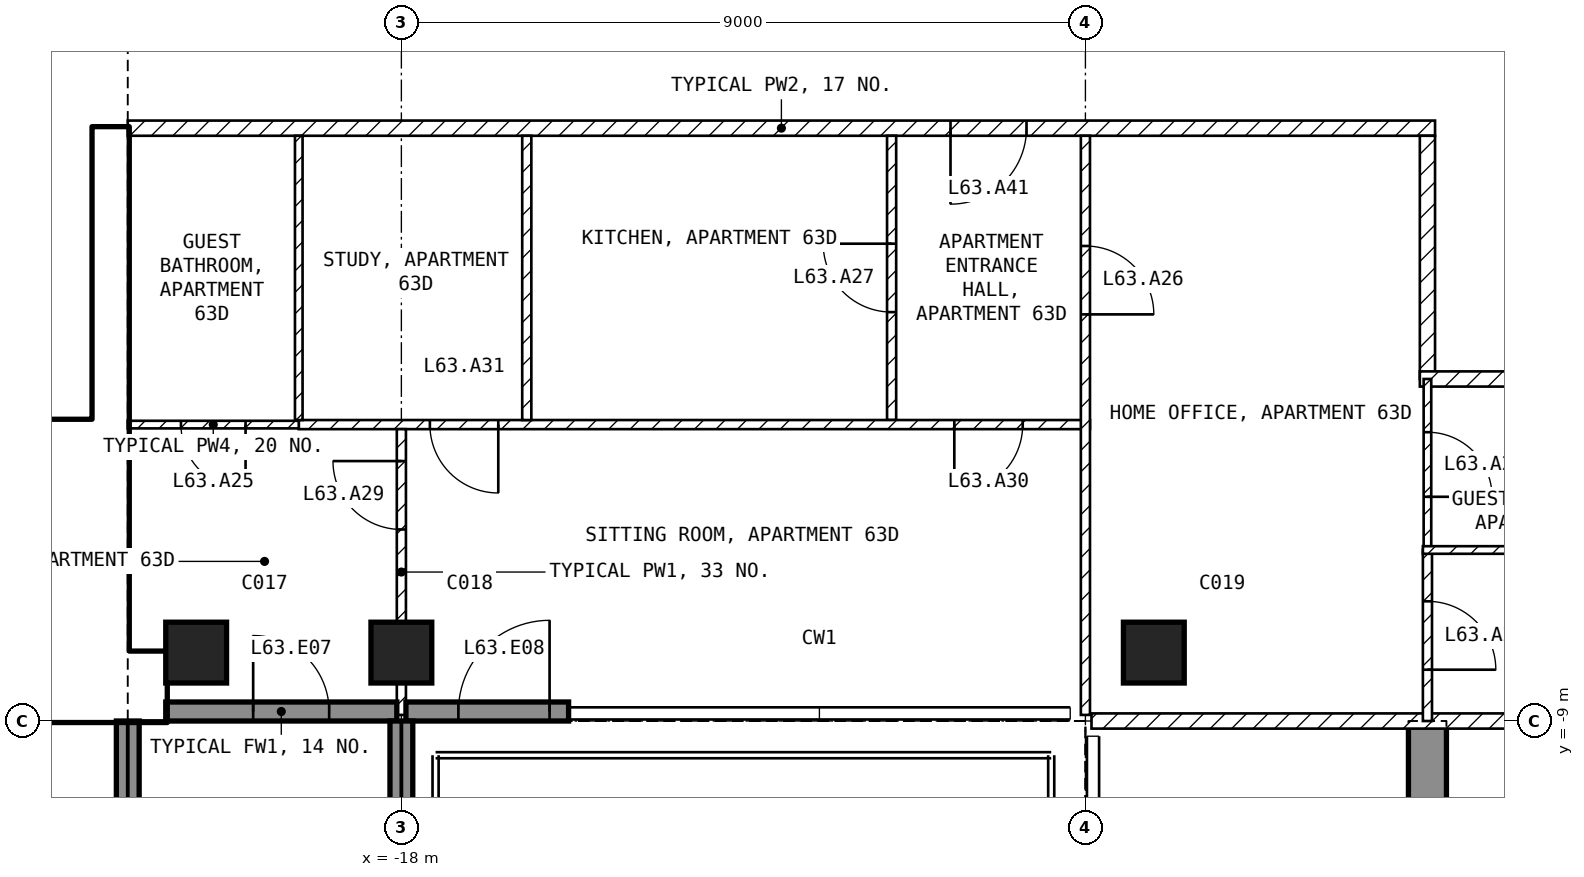
"""IFC4 building model, lengths in metres.
Left out: names, types, materials, properties, quantities, classifications, styles, units other than length and angle.
Written with IfcOpenShell. Run it as: python <this file> out.ifc"""

import sys

from ifc_helpers import new_model, si_unit, direction, frame, frame_2d, origin, origin_2d, place, context, subcontext, project, spatial, polyline, rectangle, outline, extrude, element, fill, save


model = new_model("IFC4")
c1 = context("Model", 3, precision=1e-05, world=origin(), true_north=direction((0.0, 1.0)))
c2 = subcontext(c1, "Body", "Model", "MODEL_VIEW")
j1 = project(units=[si_unit("LENGTHUNIT", "METRE"), si_unit("PLANEANGLEUNIT", "RADIAN")], contexts=[c1])
p1 = place(None, origin())
s1 = spatial("IfcSite", under=j1, at=p1, CompositionType="ELEMENT")
p2 = place(p1, origin())
s2 = spatial("IfcBuilding", under=s1, at=p2, CompositionType="ELEMENT")
p3 = place(p2, frame((0.0, 0.0, 250.0)))
s3 = spatial("IfcBuildingStorey", under=s2, at=p3, CompositionType="ELEMENT", Elevation=250.0)
for number, where, z_axis, x_axis in (
    (1, (-20.7, -8.1, -0.25), (0.0, 0.0, 1.0), (1.0, 0.0, 0.0)),
    (2, (-18.0, -8.1, -0.25), (0.0, 0.0, 1.0), (1.0, 0.0, 0.0)),
    (3, (-8.1, -8.1, -0.25), (0.0, 0.0, 1.0), (1.0, 0.0, 0.0)),
):
    element("IfcColumn", number, at=place(p3, frame(where, z_axis=z_axis, x_axis=x_axis)), inside=s3, PredefinedType="COLUMN", context=c2, shape_type="SweptSolid", body=[
        extrude(rectangle(XDim=0.8, YDim=0.8, at=origin_2d()), origin(), (0.0, 0.0, 1.0), 3.5),
    ])
p4 = place(p3, frame((-4.75, -16.7, -0.25), z_axis=(1.0, 0.0, 0.0), x_axis=(0.0, 1.0, 0.0)))
e4 = element("IfcWall", 4, at=p4, inside=s3, PredefinedType="SHEAR", context=c2, shape_type="SweptSolid", body=[
    extrude(outline(polyline([(0.0, 0.0), (3.2, 0.0), (3.2, 2.65), (5.6, 2.65), (5.6, 0.0), (7.7, 0.0), (7.7, 3.5), (0.0, 3.5), (0.0, 0.0)])), origin(), (0.0, 0.0, 1.0), 0.5),
])
p5 = place(p3, frame((-21.1, -8.875, 0.0), z_axis=(0.0, 0.0, 1.0), x_axis=(1.0, 0.0, 0.0)))
e5 = element("IfcWall", 5, at=p5, inside=s3, PredefinedType="SOLIDWALL", context=c2, shape_type="SweptSolid", body=[
    extrude(rectangle(XDim=3.04, YDim=0.25, at=frame_2d((1.52, 0.0))), origin(), (0.0, 0.0, 1.0), 3.25),
])
p6 = place(p5, frame((1.15, 0.0, 0.0)))
e6 = element("IfcOpeningElement", 6, at=p6, cuts=e5, PredefinedType="OPENING", context=c2, shape_type="SweptSolid", body=[
    extrude(rectangle(XDim=1.0, YDim=2.4, at=frame_2d((0.5, 1.2))), frame((0.0, 0.135, 0.0), z_axis=(0.0, -1.0, 0.0), x_axis=(1.0, 0.0, 0.0)), (0.0, 0.0, 1.0), 0.27),
])
p7 = place(p3, frame((-17.94, -8.875, 0.0), z_axis=(0.0, 0.0, 1.0), x_axis=(1.0, 0.0, 0.0)))
e7 = element("IfcWall", 7, at=p7, inside=s3, PredefinedType="SOLIDWALL", context=c2, shape_type="SweptSolid", body=[
    extrude(rectangle(XDim=2.14, YDim=0.25, at=frame_2d((1.07, 0.0))), origin(), (0.0, 0.0, 1.0), 3.25),
])
p8 = place(p7, frame((0.69, 0.0, 0.0)))
e8 = element("IfcOpeningElement", 8, at=p8, cuts=e7, PredefinedType="OPENING", context=c2, shape_type="SweptSolid", body=[
    extrude(rectangle(XDim=1.2, YDim=2.4, at=frame_2d((0.6, 1.2))), frame((0.0, 0.135, 0.0), z_axis=(0.0, -1.0, 0.0), x_axis=(1.0, 0.0, 0.0)), (0.0, 0.0, 1.0), 0.27),
])
p9 = place(p3, frame((-21.6, -9.0, 0.0), z_axis=(0.0, 0.0, 1.0), x_axis=(0.0, -1.0, 0.0)))
e9 = element("IfcWall", 9, at=p9, inside=s3, PredefinedType="SOLIDWALL", context=c2, shape_type="SweptSolid", body=[
    extrude(rectangle(XDim=2.7, YDim=0.3, at=frame_2d((1.35, 0.0))), origin(), (0.0, 0.0, 1.0), 3.25),
])
p10 = place(p3, frame((-18.0, -9.0, 0.0), z_axis=(0.0, 0.0, 1.0), x_axis=(0.0, -1.0, 0.0)))
e10 = element("IfcWall", 10, at=p10, inside=s3, PredefinedType="SOLIDWALL", context=c2, shape_type="SweptSolid", body=[
    extrude(rectangle(XDim=2.74, YDim=0.3, at=frame_2d((1.37, 0.0))), origin(), (0.0, 0.0, 1.0), 3.25),
])
p11 = place(p3, frame((-30.2, -8.55, 0.0), z_axis=(0.0, 0.0, 1.0), x_axis=(1.0, 0.0, 0.0)))
e11 = element("IfcWall", 11, at=p11, inside=s3, PredefinedType="SHEAR", context=c2, shape_type="SweptSolid", body=[
    extrude(rectangle(XDim=9.1, YDim=0.9, at=frame_2d((4.55, 0.0))), origin(), (0.0, 0.0, 1.0), 3.25),
])
p12 = place(p3, frame((-21.825, -8.1, 0.0), z_axis=(0.0, 0.0, 1.0), x_axis=(0.0, 1.0, 0.0)))
e12 = element("IfcWall", 12, at=p12, inside=s3, PredefinedType="SHEAR", context=c2, shape_type="SweptSolid", body=[
    extrude(rectangle(XDim=6.9, YDim=0.45, at=frame_2d((3.45, 0.0))), origin(), (0.0, 0.0, 1.0), 3.25),
])
p13 = place(p3, frame((-28.35, -5.15, 0.0), z_axis=(0.0, 0.0, 1.0), x_axis=(1.0, 0.0, 0.0)))
e13 = element("IfcWall", 13, at=p13, inside=s3, PredefinedType="SOLIDWALL", context=c2, shape_type="SweptSolid", body=[
    extrude(rectangle(XDim=6.3, YDim=0.2, at=frame_2d((3.15, 0.0))), origin(), (0.0, 0.0, 1.0), 3.25),
])
p14 = place(p13, frame((5.1, 0.0, 0.0)))
e14 = element("IfcOpeningElement", 14, at=p14, cuts=e13, PredefinedType="OPENING", context=c2, shape_type="SweptSolid", body=[
    extrude(rectangle(XDim=1.0, YDim=2.1, at=frame_2d((0.5, 1.05))), frame((0.0, 0.11, 0.0), z_axis=(0.0, -1.0, 0.0), x_axis=(1.0, 0.0, 0.0)), (0.0, 0.0, 1.0), 0.22),
])
p15 = place(p3, frame((-4.4, -1.2, 0.0), z_axis=(0.0, 0.0, 1.0), x_axis=(-1.0, 0.0, 0.0)))
e15 = element("IfcWall", 15, at=p15, inside=s3, PredefinedType="PARTITIONING", context=c2, shape_type="SweptSolid", body=[
    extrude(rectangle(XDim=17.2, YDim=0.2, at=frame_2d((8.6, 0.0))), origin(), (0.0, 0.0, 1.0), 3.25),
])
p16 = place(p15, frame((5.375, 0.0, 0.0)))
e16 = element("IfcOpeningElement", 16, at=p16, cuts=e15, PredefinedType="OPENING", context=c2, shape_type="SweptSolid", body=[
    extrude(rectangle(XDim=1.0, YDim=2.1, at=frame_2d((0.5, 1.05))), frame((0.0, 0.11, 0.0), z_axis=(0.0, -1.0, 0.0), x_axis=(1.0, 0.0, 0.0)), (0.0, 0.0, 1.0), 0.22),
])
p17 = place(p3, frame((-4.5, -4.5, 0.0), z_axis=(0.0, 0.0, 1.0), x_axis=(0.0, 1.0, 0.0)))
e17 = element("IfcWall", 17, at=p17, inside=s3, PredefinedType="PARTITIONING", context=c2, shape_type="SweptSolid", body=[
    extrude(rectangle(XDim=3.2, YDim=0.2, at=frame_2d((1.6, 0.0))), origin(), (0.0, 0.0, 1.0), 3.25),
])
p18 = place(p3, frame((-1.1, -4.5, 0.0), z_axis=(0.0, 0.0, 1.0), x_axis=(-1.0, 0.0, 0.0)))
e18 = element("IfcWall", 18, at=p18, inside=s3, PredefinedType="PARTITIONING", context=c2, shape_type="SweptSolid", body=[
    extrude(rectangle(XDim=3.5, YDim=0.2, at=frame_2d((1.75, 0.0))), origin(), (0.0, 0.0, 1.0), 3.25),
])
p19 = place(p3, frame((8.92, -9.0, 0.0), z_axis=(0.0, 0.0, 1.0), x_axis=(-1.0, 0.0, 0.0)))
e19 = element("IfcWall", 19, at=p19, inside=s3, PredefinedType="PARTITIONING", context=c2, shape_type="SweptSolid", body=[
    extrude(rectangle(XDim=17.84, YDim=0.2, at=frame_2d((8.92, 0.0))), origin(), (0.0, 0.0, 1.0), 3.25),
])
p20 = place(p19, frame((8.42, 0.0, 0.0)))
e20 = element("IfcOpeningElement", 20, at=p20, cuts=e19, PredefinedType="OPENING", context=c2, shape_type="SweptSolid", body=[
    extrude(rectangle(XDim=1.0, YDim=2.1, at=frame_2d((0.5, 1.05))), frame((0.0, 0.11, 0.0), z_axis=(0.0, -1.0, 0.0), x_axis=(1.0, 0.0, 0.0)), (0.0, 0.0, 1.0), 0.22),
])
p21 = place(p3, frame((-11.55, -5.04, 0.0), z_axis=(0.0, 0.0, 1.0), x_axis=(0.0, 1.0, 0.0)))
e21 = element("IfcWall", 21, at=p21, inside=s3, PredefinedType="PARTITIONING", context=c2, shape_type="SweptSolid", body=[
    extrude(rectangle(XDim=3.74, YDim=0.12, at=frame_2d((1.87, 0.0))), origin(), (0.0, 0.0, 1.0), 3.25),
])
p22 = place(p21, frame((1.42, 0.0, 0.0)))
e22 = element("IfcOpeningElement", 22, at=p22, cuts=e21, PredefinedType="OPENING", context=c2, shape_type="SweptSolid", body=[
    extrude(rectangle(XDim=0.9, YDim=2.1, at=frame_2d((0.45, 1.05))), frame((0.0, 0.07, 0.0), z_axis=(0.0, -1.0, 0.0), x_axis=(1.0, 0.0, 0.0)), (0.0, 0.0, 1.0), 0.14),
])
p23 = place(p3, frame((-8.94, -5.1, 0.0), z_axis=(0.0, 0.0, 1.0), x_axis=(-1.0, 0.0, 0.0)))
e23 = element("IfcWall", 23, at=p23, inside=s3, PredefinedType="PARTITIONING", context=c2, shape_type="SweptSolid", body=[
    extrude(rectangle(XDim=10.41, YDim=0.12, at=frame_2d((5.205, 0.0))), origin(), (0.0, 0.0, 1.0), 3.25),
])
p24 = place(p23, frame((0.885, 0.0, 0.0)))
e24 = element("IfcOpeningElement", 24, at=p24, cuts=e23, PredefinedType="OPENING", context=c2, shape_type="SweptSolid", body=[
    extrude(rectangle(XDim=0.9, YDim=2.1, at=frame_2d((0.45, 1.05))), frame((0.0, 0.07, 0.0), z_axis=(0.0, -1.0, 0.0), x_axis=(1.0, 0.0, 0.0)), (0.0, 0.0, 1.0), 0.14),
])
p25 = place(p23, frame((7.785, 0.0, 0.0)))
e25 = element("IfcOpeningElement", 25, at=p25, cuts=e23, PredefinedType="OPENING", context=c2, shape_type="SweptSolid", body=[
    extrude(rectangle(XDim=0.9, YDim=2.1, at=frame_2d((0.45, 1.05))), frame((0.0, 0.07, 0.0), z_axis=(0.0, -1.0, 0.0), x_axis=(1.0, 0.0, 0.0)), (0.0, 0.0, 1.0), 0.14),
])
p26 = place(p3, frame((-9.0, -1.3, 0.0), z_axis=(0.0, 0.0, 1.0), x_axis=(0.0, -1.0, 0.0)))
e26 = element("IfcWall", 26, at=p26, inside=s3, PredefinedType="PARTITIONING", context=c2, shape_type="SweptSolid", body=[
    extrude(rectangle(XDim=7.62, YDim=0.12, at=frame_2d((3.81, 0.0))), origin(), (0.0, 0.0, 1.0), 3.25),
])
p27 = place(p26, frame((1.45, 0.0, 0.0)))
e27 = element("IfcOpeningElement", 27, at=p27, cuts=e26, PredefinedType="OPENING", context=c2, shape_type="SweptSolid", body=[
    extrude(rectangle(XDim=0.9, YDim=2.1, at=frame_2d((0.45, 1.05))), frame((0.0, 0.07, 0.0), z_axis=(0.0, -1.0, 0.0), x_axis=(1.0, 0.0, 0.0)), (0.0, 0.0, 1.0), 0.14),
])
p28 = place(p3, frame((-16.35, -5.04, 0.0), z_axis=(0.0, 0.0, 1.0), x_axis=(0.0, 1.0, 0.0)))
e28 = element("IfcWall", 28, at=p28, inside=s3, PredefinedType="PARTITIONING", context=c2, shape_type="SweptSolid", body=[
    extrude(rectangle(XDim=3.74, YDim=0.12, at=frame_2d((1.87, 0.0))), origin(), (0.0, 0.0, 1.0), 3.25),
])
p29 = place(p3, frame((-19.35, -5.04, 0.0), z_axis=(0.0, 0.0, 1.0), x_axis=(0.0, 1.0, 0.0)))
e29 = element("IfcWall", 29, at=p29, inside=s3, PredefinedType="PARTITIONING", context=c2, shape_type="SweptSolid", body=[
    extrude(rectangle(XDim=3.74, YDim=0.1, at=frame_2d((1.87, 0.0))), origin(), (0.0, 0.0, 1.0), 3.25),
])
p30 = place(p3, frame((-19.35, -5.1, 0.0), z_axis=(0.0, 0.0, 1.0), x_axis=(-1.0, 0.0, 0.0)))
e30 = element("IfcWall", 30, at=p30, inside=s3, PredefinedType="PARTITIONING", context=c2, shape_type="SweptSolid", body=[
    extrude(rectangle(XDim=2.25, YDim=0.1, at=frame_2d((1.125, 0.0))), origin(), (0.0, 0.0, 1.0), 3.25),
])
p31 = place(p30, frame((0.7, 0.0, 0.0)))
e31 = element("IfcOpeningElement", 31, at=p31, cuts=e30, PredefinedType="OPENING", context=c2, shape_type="SweptSolid", body=[
    extrude(rectangle(XDim=0.85, YDim=2.1, at=frame_2d((0.425, 1.05))), frame((0.0, 0.06, 0.0), z_axis=(0.0, -1.0, 0.0), x_axis=(1.0, 0.0, 0.0)), (0.0, 0.0, 1.0), 0.12),
])
p32 = place(p3, frame((-18.0, -8.92, 0.0), z_axis=(0.0, 0.0, 1.0), x_axis=(0.0, 1.0, 0.0)))
e32 = element("IfcWall", 32, at=p32, inside=s3, PredefinedType="PARTITIONING", context=c2, shape_type="SweptSolid", body=[
    extrude(rectangle(XDim=3.76, YDim=0.12, at=frame_2d((1.88, 0.0))), origin(), (0.0, 0.0, 1.0), 2.496),
])
p33 = place(p32, frame((2.44, 0.0, 0.0)))
e33 = element("IfcOpeningElement", 33, at=p33, cuts=e32, PredefinedType="OPENING", context=c2, shape_type="SweptSolid", body=[
    extrude(rectangle(XDim=0.9, YDim=2.1, at=frame_2d((0.45, 1.05))), frame((0.0, 0.07, 0.0), z_axis=(0.0, -1.0, 0.0), x_axis=(1.0, 0.0, 0.0)), (0.0, 0.0, 1.0), 0.14),
])
p34 = place(p3, frame((-4.5, -4.5, 0.0), z_axis=(0.0, 0.0, 1.0), x_axis=(0.0, -1.0, 0.0)))
e34 = element("IfcWall", 34, at=p34, inside=s3, PredefinedType="PARTITIONING", context=c2, shape_type="SweptSolid", body=[
    extrude(rectangle(XDim=2.25, YDim=0.1, at=frame_2d((1.125, 0.0))), origin(), (0.0, 0.0, 1.0), 3.25),
])
p35 = place(p34, frame((0.7, 0.0, 0.0)))
e35 = element("IfcOpeningElement", 35, at=p35, cuts=e34, PredefinedType="OPENING", context=c2, shape_type="SweptSolid", body=[
    extrude(rectangle(XDim=0.85, YDim=2.1, at=frame_2d((0.425, 1.05))), frame((0.0, 0.06, 0.0), z_axis=(0.0, -1.0, 0.0), x_axis=(1.0, 0.0, 0.0)), (0.0, 0.0, 1.0), 0.12),
])
p36 = place(p3, frame((-4.5, -6.75, 0.0), z_axis=(0.0, 0.0, 1.0), x_axis=(0.0, -1.0, 0.0)))
e36 = element("IfcWall", 36, at=p36, inside=s3, PredefinedType="PARTITIONING", context=c2, shape_type="SweptSolid", body=[
    extrude(rectangle(XDim=2.25, YDim=0.12, at=frame_2d((1.125, 0.0))), origin(), (0.0, 0.0, 1.0), 3.25),
])
p37 = place(p36, frame((0.675, 0.0, 0.0)))
e37 = element("IfcOpeningElement", 37, at=p37, cuts=e36, PredefinedType="OPENING", context=c2, shape_type="SweptSolid", body=[
    extrude(rectangle(XDim=0.9, YDim=2.1, at=frame_2d((0.45, 1.05))), frame((0.0, 0.07, 0.0), z_axis=(0.0, -1.0, 0.0), x_axis=(1.0, 0.0, 0.0)), (0.0, 0.0, 1.0), 0.14),
])
p38 = place(p3, frame((-1.1, -6.75, 0.0), z_axis=(0.0, 0.0, 1.0), x_axis=(-1.0, 0.0, 0.0)))
e38 = element("IfcWall", 38, at=p38, inside=s3, PredefinedType="PARTITIONING", context=c2, shape_type="SweptSolid", body=[
    extrude(rectangle(XDim=3.46, YDim=0.1, at=frame_2d((1.73, 0.0))), origin(), (0.0, 0.0, 1.0), 3.25),
])
p39 = place(p6, origin())
e39 = element("IfcDoor", 39, at=p39, inside=s3, OperationType="SINGLE_SWING_LEFT", PredefinedType="DOOR", context=c2, shape_type="SweptSolid", body=[
    extrude(rectangle(XDim=1.0, YDim=2.4, at=frame_2d((0.5, 1.2))), frame((0.0, 0.025, 0.0), z_axis=(0.0, -1.0, 0.0), x_axis=(1.0, 0.0, 0.0)), (0.0, 0.0, 1.0), 0.05),
])
fill(e6, e39)
p40 = place(p8, origin())
e40 = element("IfcDoor", 40, at=p40, inside=s3, OperationType="SINGLE_SWING_RIGHT", PredefinedType="DOOR", context=c2, shape_type="SweptSolid", body=[
    extrude(rectangle(XDim=1.2, YDim=2.4, at=frame_2d((0.6, 1.2))), frame((0.0, 0.025, 0.0), z_axis=(0.0, -1.0, 0.0), x_axis=(1.0, 0.0, 0.0)), (0.0, 0.0, 1.0), 0.05),
])
fill(e8, e40)
p41 = place(p14, origin())
e41 = element("IfcDoor", 41, at=p41, inside=s3, OperationType="SINGLE_SWING_LEFT", PredefinedType="DOOR", context=c2, shape_type="SweptSolid", body=[
    extrude(rectangle(XDim=1.0, YDim=2.1, at=frame_2d((0.5, 1.05))), frame((0.0, 0.025, 0.0), z_axis=(0.0, -1.0, 0.0), x_axis=(1.0, 0.0, 0.0)), (0.0, 0.0, 1.0), 0.05),
])
fill(e14, e41)
p42 = place(p35, origin())
e42 = element("IfcDoor", 42, at=p42, inside=s3, OperationType="SINGLE_SWING_RIGHT", PredefinedType="DOOR", context=c2, shape_type="SweptSolid", body=[
    extrude(rectangle(XDim=0.85, YDim=2.1, at=frame_2d((0.425, 1.05))), frame((0.0, 0.025, 0.0), z_axis=(0.0, -1.0, 0.0), x_axis=(1.0, 0.0, 0.0)), (0.0, 0.0, 1.0), 0.05),
])
fill(e35, e42)
p43 = place(p31, origin())
e43 = element("IfcDoor", 43, at=p43, inside=s3, OperationType="SINGLE_SWING_LEFT", PredefinedType="DOOR", context=c2, shape_type="SweptSolid", body=[
    extrude(rectangle(XDim=0.85, YDim=2.1, at=frame_2d((0.425, 1.05))), frame((0.0, 0.025, 0.0), z_axis=(0.0, -1.0, 0.0), x_axis=(1.0, 0.0, 0.0)), (0.0, 0.0, 1.0), 0.05),
])
fill(e31, e43)
p44 = place(p27, origin())
e44 = element("IfcDoor", 44, at=p44, inside=s3, OperationType="SINGLE_SWING_RIGHT", PredefinedType="DOOR", context=c2, shape_type="SweptSolid", body=[
    extrude(rectangle(XDim=0.9, YDim=2.1, at=frame_2d((0.45, 1.05))), frame((0.0, 0.025, 0.0), z_axis=(0.0, -1.0, 0.0), x_axis=(1.0, 0.0, 0.0)), (0.0, 0.0, 1.0), 0.05),
])
fill(e27, e44)
p45 = place(p22, origin())
e45 = element("IfcDoor", 45, at=p45, inside=s3, OperationType="SINGLE_SWING_RIGHT", PredefinedType="DOOR", context=c2, shape_type="SweptSolid", body=[
    extrude(rectangle(XDim=0.9, YDim=2.1, at=frame_2d((0.45, 1.05))), frame((0.0, 0.025, 0.0), z_axis=(0.0, -1.0, 0.0), x_axis=(1.0, 0.0, 0.0)), (0.0, 0.0, 1.0), 0.05),
])
fill(e22, e45)
p46 = place(p37, origin())
e46 = element("IfcDoor", 46, at=p46, inside=s3, OperationType="SINGLE_SWING_RIGHT", PredefinedType="DOOR", context=c2, shape_type="SweptSolid", body=[
    extrude(rectangle(XDim=0.9, YDim=2.1, at=frame_2d((0.45, 1.05))), frame((0.0, 0.025, 0.0), z_axis=(0.0, -1.0, 0.0), x_axis=(1.0, 0.0, 0.0)), (0.0, 0.0, 1.0), 0.05),
])
fill(e37, e46)
p47 = place(p33, origin())
e47 = element("IfcDoor", 47, at=p47, inside=s3, OperationType="SINGLE_SWING_RIGHT", PredefinedType="DOOR", context=c2, shape_type="SweptSolid", body=[
    extrude(rectangle(XDim=0.9, YDim=2.1, at=frame_2d((0.45, 1.05))), frame((0.0, 0.025, 0.0), z_axis=(0.0, -1.0, 0.0), x_axis=(1.0, 0.0, 0.0)), (0.0, 0.0, 1.0), 0.05),
])
fill(e33, e47)
p48 = place(p24, origin())
e48 = element("IfcDoor", 48, at=p48, inside=s3, OperationType="SINGLE_SWING_RIGHT", PredefinedType="DOOR", context=c2, shape_type="SweptSolid", body=[
    extrude(rectangle(XDim=0.9, YDim=2.1, at=frame_2d((0.45, 1.05))), frame((0.0, 0.025, 0.0), z_axis=(0.0, -1.0, 0.0), x_axis=(1.0, 0.0, 0.0)), (0.0, 0.0, 1.0), 0.05),
])
fill(e24, e48)
p49 = place(p25, origin())
e49 = element("IfcDoor", 49, at=p49, inside=s3, OperationType="SINGLE_SWING_LEFT", PredefinedType="DOOR", context=c2, shape_type="SweptSolid", body=[
    extrude(rectangle(XDim=0.9, YDim=2.1, at=frame_2d((0.45, 1.05))), frame((0.0, 0.025, 0.0), z_axis=(0.0, -1.0, 0.0), x_axis=(1.0, 0.0, 0.0)), (0.0, 0.0, 1.0), 0.05),
])
fill(e25, e49)
p50 = place(p16, origin())
e50 = element("IfcDoor", 50, at=p50, inside=s3, OperationType="SINGLE_SWING_RIGHT", PredefinedType="DOOR", context=c2, shape_type="SweptSolid", body=[
    extrude(rectangle(XDim=1.0, YDim=2.1, at=frame_2d((0.5, 1.05))), frame((0.0, 0.025, 0.0), z_axis=(0.0, -1.0, 0.0), x_axis=(1.0, 0.0, 0.0)), (0.0, 0.0, 1.0), 0.05),
])
fill(e16, e50)
save(model, sys.argv[1])
